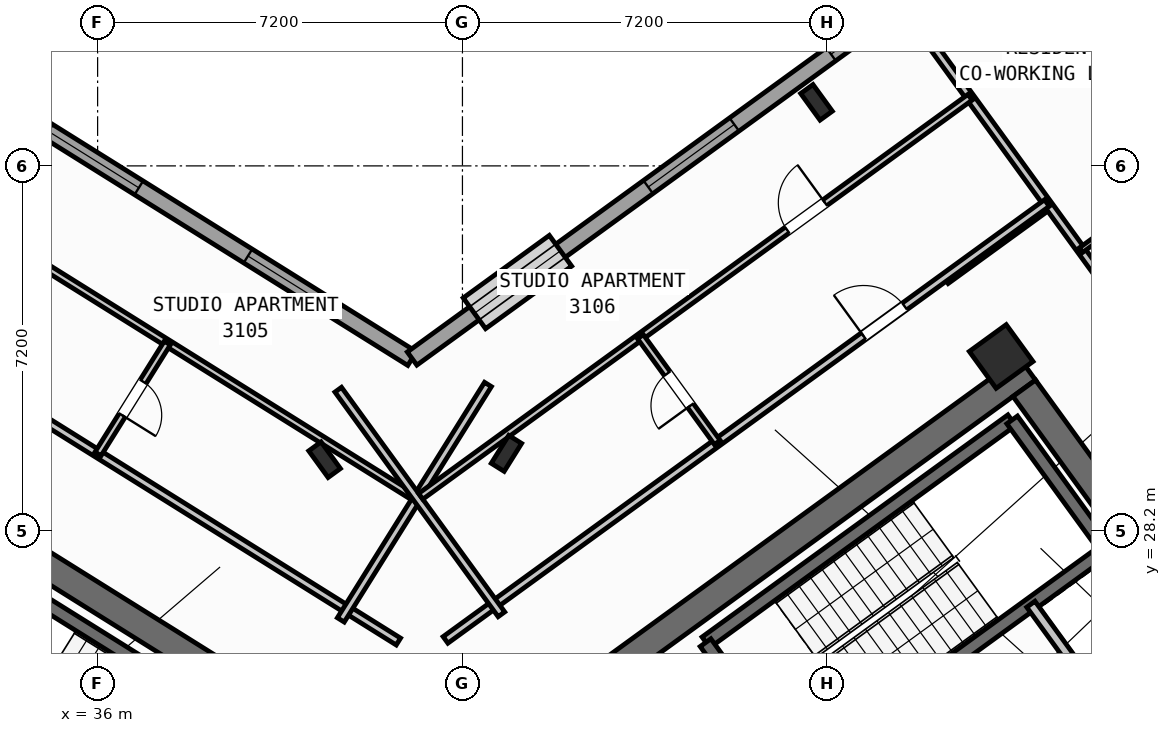
"""IFC4 building model, lengths in metres.
Left out: names, types, materials, properties, quantities, classifications, styles, units other than length and angle.
Written with IfcOpenShell. Run it as: python <this file> out.ifc"""

import sys

from ifc_helpers import new_model, si_unit, direction, frame, frame_2d, origin, origin_2d, place, context, subcontext, project, spatial, rectangle, hollow_rectangle, i_section, extrude, source, transform, mapped, element, fill, save


model = new_model("IFC4")
c1 = context("Model", 3, precision=1e-05, world=origin(), true_north=direction((0.0, 1.0)))
c2 = subcontext(c1, "Body", "Model", "MODEL_VIEW")
j1 = project(units=[si_unit("LENGTHUNIT", "METRE"), si_unit("PLANEANGLEUNIT", "RADIAN")], contexts=[c1])
p1 = place(None, origin())
s1 = spatial("IfcSite", under=j1, at=p1, CompositionType="ELEMENT")
p2 = place(p1, origin())
s2 = spatial("IfcBuilding", under=s1, at=p2, CompositionType="ELEMENT")
p3 = place(p2, frame((0.0, 0.0, 123.3)))
s3 = spatial("IfcBuildingStorey", under=s2, at=p3, CompositionType="ELEMENT", Elevation=123.3)
p4 = place(p3, frame((40.573, 24.01, 0.0), z_axis=(0.0, 0.0, 1.0), x_axis=(-0.848047359947, 0.529920442413, 0.0)))
e1 = element("IfcWall", 1, at=p4, inside=s3, PredefinedType="SHEAR", context=c2, shape_type="SweptSolid", body=[
    extrude(rectangle(XDim=13.14, YDim=0.55, at=frame_2d((6.57, 0.0))), origin(), (0.0, 0.0, 1.0), 4.22),
])
p5 = place(p3, frame((44.365, 24.142, 0.0), z_axis=(0.0, 0.0, 1.0), x_axis=(0.809024304885, 0.587775190107, 0.0)))
e2 = element("IfcWall", 2, at=p5, inside=s3, PredefinedType="SHEAR", context=c2, shape_type="SweptSolid", body=[
    extrude(rectangle(XDim=12.34, YDim=0.55, at=frame_2d((6.17, 0.0))), origin(), (0.0, 0.0, 1.0), 4.22),
])
p6 = place(p3, frame((58.064, 25.813, 0.0), z_axis=(0.0, 0.0, 1.0), x_axis=(-0.587764933797, 0.809031756236, 0.0)))
e3 = element("IfcWall", 3, at=p6, inside=s3, PredefinedType="SHEAR", context=c2, shape_type="SweptSolid", body=[
    extrude(rectangle(XDim=6.425, YDim=0.55, at=frame_2d((3.212, 0.0))), origin(), (0.0, 0.0, 1.0), 4.22),
])
m1 = source(origin(), c2, "Body", "SweptSolid", [
    extrude(i_section(OverallWidth=0.3, OverallDepth=0.65, WebThickness=0.016, FlangeThickness=0.031, at=origin_2d()), origin(), (0.0, 0.0, 1.0), 4.5),
])
for number, where, z_axis, x_axis in (
    (4, (44.068, 29.726, 0.0), (0.0, 0.0, 1.0), (-0.848, 0.53, 0.0)),
    (5, (40.479, 29.601, 0.0), (0.0, 0.0, 1.0), (0.809, 0.588, 0.0)),
):
    element("IfcColumn", number, at=place(p3, frame(where, z_axis=z_axis, x_axis=x_axis)), inside=s3, PredefinedType="COLUMN", context=c2, shape_type="MappedRepresentation", body=[
        mapped(m1, transform((0.0, 0.0, 0.0), scale=1.0)),
    ])
m2 = source(origin(), c2, "Body", "SweptSolid", [
    extrude(hollow_rectangle(XDim=0.9, YDim=0.9, WallThickness=0.036, at=origin_2d()), origin(), (0.0, 0.0, 1.0), 4.5),
])
p7 = place(p3, frame((53.832, 31.638, 0.0), z_axis=(0.0, 0.0, 1.0), x_axis=(0.809016994375, 0.587785252292, 0.0)))
e6 = element("IfcColumn", 6, at=p7, inside=s3, PredefinedType="COLUMN", context=c2, shape_type="MappedRepresentation", body=[
    mapped(m2, transform((0.0, 0.0, 0.0), scale=1.0)),
])
p8 = place(p3, frame((50.188, 36.654, 0.0), z_axis=(0.0, 0.0, 1.0), x_axis=(0.809016994375, 0.587785252292, 0.0)))
e7 = element("IfcColumn", 7, at=p8, inside=s3, PredefinedType="COLUMN", context=c2, shape_type="MappedRepresentation", body=[
    mapped(m1, transform((0.0, 0.0, 0.0), scale=1.0)),
])
p9 = place(p3, frame((17.424, 47.083, 0.0), z_axis=(0.0, 0.0, 1.0), x_axis=(0.848049927979, -0.529916332693, 0.0)))
e8 = element("IfcWall", 8, at=p9, inside=s3, PredefinedType="STANDARD", context=c2, shape_type="SweptSolid", body=[
    extrude(rectangle(XDim=29.223, YDim=0.32, at=frame_2d((14.612, 0.0))), origin(), (0.0, 0.0, 1.0), 4.22),
])
p10 = place(p9, frame((8.839, 0.0, 0.0)))
e9 = element("IfcOpeningElement", 9, at=p10, cuts=e8, PredefinedType="OPENING", context=c2, shape_type="SweptSolid", body=[
    extrude(rectangle(XDim=1.05, YDim=2.15, at=frame_2d((0.525, 1.075))), frame((0.0, 0.17, 0.0), z_axis=(0.0, -1.0, 0.0), x_axis=(1.0, 0.0, 0.0)), (0.0, 0.0, 1.0), 0.34),
])
p11 = place(p9, frame((0.719, 0.0, 0.85)))
e10 = element("IfcOpeningElement", 10, at=p11, cuts=e8, PredefinedType="OPENING", context=c2, shape_type="SweptSolid", body=[
    extrude(rectangle(XDim=1.8, YDim=1.5, at=frame_2d((0.9, 0.75))), frame((0.0, 0.17, 0.0), z_axis=(0.0, -1.0, 0.0), x_axis=(1.0, 0.0, 0.0)), (0.0, 0.0, 1.0), 0.34),
])
p12 = place(p9, frame((3.981, 0.0, 0.85)))
e11 = element("IfcOpeningElement", 11, at=p12, cuts=e8, PredefinedType="OPENING", context=c2, shape_type="SweptSolid", body=[
    extrude(rectangle(XDim=1.5, YDim=1.5, at=frame_2d((0.75, 0.75))), frame((0.0, 0.17, 0.0), z_axis=(0.0, -1.0, 0.0), x_axis=(1.0, 0.0, 0.0)), (0.0, 0.0, 1.0), 0.34),
])
p13 = place(p9, frame((7.021, 0.0, 0.95)))
e12 = element("IfcOpeningElement", 12, at=p13, cuts=e8, PredefinedType="OPENING", context=c2, shape_type="SweptSolid", body=[
    extrude(rectangle(XDim=1.2, YDim=1.4, at=frame_2d((0.6, 0.7))), frame((0.0, 0.17, 0.0), z_axis=(0.0, -1.0, 0.0), x_axis=(1.0, 0.0, 0.0)), (0.0, 0.0, 1.0), 0.34),
])
p14 = place(p9, frame((14.471, 0.0, 0.95)))
e13 = element("IfcOpeningElement", 13, at=p14, cuts=e8, PredefinedType="OPENING", context=c2, shape_type="SweptSolid", body=[
    extrude(rectangle(XDim=1.2, YDim=1.4, at=frame_2d((0.6, 0.7))), frame((0.0, 0.17, 0.0), z_axis=(0.0, -1.0, 0.0), x_axis=(1.0, 0.0, 0.0)), (0.0, 0.0, 1.0), 0.34),
])
p15 = place(p9, frame((17.254, 0.0, 1.0)))
e14 = element("IfcOpeningElement", 14, at=p15, cuts=e8, PredefinedType="OPENING", context=c2, shape_type="SweptSolid", body=[
    extrude(rectangle(XDim=0.9, YDim=1.25, at=frame_2d((0.45, 0.625))), frame((0.0, 0.17, 0.0), z_axis=(0.0, -1.0, 0.0), x_axis=(1.0, 0.0, 0.0)), (0.0, 0.0, 1.0), 0.34),
])
p16 = place(p9, frame((20.764, 0.0, 0.8)))
e15 = element("IfcOpeningElement", 15, at=p16, cuts=e8, PredefinedType="OPENING", context=c2, shape_type="SweptSolid", body=[
    extrude(rectangle(XDim=2.1, YDim=1.55, at=frame_2d((1.05, 0.775))), frame((0.0, 0.17, 0.0), z_axis=(0.0, -1.0, 0.0), x_axis=(1.0, 0.0, 0.0)), (0.0, 0.0, 1.0), 0.34),
])
p17 = place(p9, frame((25.403, 0.0, 0.8)))
e16 = element("IfcOpeningElement", 16, at=p17, cuts=e8, PredefinedType="OPENING", context=c2, shape_type="SweptSolid", body=[
    extrude(rectangle(XDim=2.1, YDim=1.55, at=frame_2d((1.05, 0.775))), frame((0.0, 0.17, 0.0), z_axis=(0.0, -1.0, 0.0), x_axis=(1.0, 0.0, 0.0)), (0.0, 0.0, 1.0), 0.34),
])
p18 = place(p3, frame((42.207, 31.597, 0.0), z_axis=(0.0, 0.0, 1.0), x_axis=(0.809020333377, 0.587780656523, 0.0)))
e17 = element("IfcWall", 17, at=p18, inside=s3, PredefinedType="STANDARD", context=c2, shape_type="SweptSolid", body=[
    extrude(rectangle(XDim=15.223, YDim=0.32, at=frame_2d((7.611, 0.0))), origin(), (0.0, 0.0, 1.0), 4.22),
])
p19 = place(p18, frame((12.82, 0.0, 0.0)))
e18 = element("IfcOpeningElement", 18, at=p19, cuts=e17, PredefinedType="OPENING", context=c2, shape_type="SweptSolid", body=[
    extrude(rectangle(XDim=1.05, YDim=2.15, at=frame_2d((0.525, 1.075))), frame((0.0, 0.17, 0.0), z_axis=(0.0, -1.0, 0.0), x_axis=(1.0, 0.0, 0.0)), (0.0, 0.0, 1.0), 0.34),
])
p20 = place(p18, frame((1.52, 0.0, 0.8)))
e19 = element("IfcOpeningElement", 19, at=p20, cuts=e17, PredefinedType="OPENING", context=c2, shape_type="SweptSolid", body=[
    extrude(rectangle(XDim=2.1, YDim=1.55, at=frame_2d((1.05, 0.775))), frame((0.0, 0.17, 0.0), z_axis=(0.0, -1.0, 0.0), x_axis=(1.0, 0.0, 0.0)), (0.0, 0.0, 1.0), 0.34),
])
p21 = place(p18, frame((5.76, 0.0, 0.8)))
e20 = element("IfcOpeningElement", 20, at=p21, cuts=e17, PredefinedType="OPENING", context=c2, shape_type="SweptSolid", body=[
    extrude(rectangle(XDim=2.1, YDim=1.55, at=frame_2d((1.05, 0.775))), frame((0.0, 0.17, 0.0), z_axis=(0.0, -1.0, 0.0), x_axis=(1.0, 0.0, 0.0)), (0.0, 0.0, 1.0), 0.34),
])
p22 = place(p18, frame((10.219, 0.0, 1.0)))
e21 = element("IfcOpeningElement", 21, at=p22, cuts=e17, PredefinedType="OPENING", context=c2, shape_type="SweptSolid", body=[
    extrude(rectangle(XDim=0.9, YDim=1.25, at=frame_2d((0.45, 0.625))), frame((0.0, 0.17, 0.0), z_axis=(0.0, -1.0, 0.0), x_axis=(1.0, 0.0, 0.0)), (0.0, 0.0, 1.0), 0.34),
])
p23 = place(p3, frame((54.81, 40.5, 0.0), z_axis=(0.0, 0.0, 1.0), x_axis=(0.587783625747, -0.809018176127, 0.0)))
e22 = element("IfcWall", 22, at=p23, inside=s3, PredefinedType="STANDARD", context=c2, shape_type="SweptSolid", body=[
    extrude(rectangle(XDim=21.587, YDim=0.32, at=frame_2d((10.794, 0.0))), origin(), (0.0, 0.0, 1.0), 2.395),
])
p24 = place(p23, frame((1.681, 0.0, 1.0)))
e23 = element("IfcOpeningElement", 23, at=p24, cuts=e22, PredefinedType="OPENING", context=c2, shape_type="SweptSolid", body=[
    extrude(rectangle(XDim=0.9, YDim=1.25, at=frame_2d((0.45, 0.625))), frame((0.0, 0.17, 0.0), z_axis=(0.0, -1.0, 0.0), x_axis=(1.0, 0.0, 0.0)), (0.0, 0.0, 1.0), 0.34),
])
p25 = place(p23, frame((3.805, 0.0, 1.0)))
e24 = element("IfcOpeningElement", 24, at=p25, cuts=e22, PredefinedType="OPENING", context=c2, shape_type="SweptSolid", body=[
    extrude(rectangle(XDim=0.9, YDim=1.25, at=frame_2d((0.45, 0.625))), frame((0.0, 0.17, 0.0), z_axis=(0.0, -1.0, 0.0), x_axis=(1.0, 0.0, 0.0)), (0.0, 0.0, 1.0), 0.34),
])
p26 = place(p23, frame((8.369, 0.0, 1.0)))
e25 = element("IfcOpeningElement", 25, at=p26, cuts=e22, PredefinedType="OPENING", context=c2, shape_type="SweptSolid", body=[
    extrude(rectangle(XDim=0.9, YDim=1.25, at=frame_2d((0.45, 0.625))), frame((0.0, 0.17, 0.0), z_axis=(0.0, -1.0, 0.0), x_axis=(1.0, 0.0, 0.0)), (0.0, 0.0, 1.0), 0.34),
])
p27 = place(p23, frame((11.219, 0.0, 1.0)))
e26 = element("IfcOpeningElement", 26, at=p27, cuts=e22, PredefinedType="OPENING", context=c2, shape_type="SweptSolid", body=[
    extrude(rectangle(XDim=0.9, YDim=1.25, at=frame_2d((0.45, 0.625))), frame((0.0, 0.17, 0.0), z_axis=(0.0, -1.0, 0.0), x_axis=(1.0, 0.0, 0.0)), (0.0, 0.0, 1.0), 0.34),
])
p28 = place(p23, frame((18.609, 0.0, 1.0)))
e27 = element("IfcOpeningElement", 27, at=p28, cuts=e22, PredefinedType="OPENING", context=c2, shape_type="SweptSolid", body=[
    extrude(rectangle(XDim=0.9, YDim=1.25, at=frame_2d((0.45, 0.625))), frame((0.0, 0.17, 0.0), z_axis=(0.0, -1.0, 0.0), x_axis=(1.0, 0.0, 0.0)), (0.0, 0.0, 1.0), 0.34),
])
p29 = place(p3, frame((39.721, 23.788, 0.0), z_axis=(0.0, 0.0, 1.0), x_axis=(-0.848054434086, 0.529909121291, 0.0)))
e28 = element("IfcWall", 28, at=p29, inside=s3, PredefinedType="SHEAR", context=c2, shape_type="SweptSolid", body=[
    extrude(rectangle(XDim=7.33, YDim=0.26, at=frame_2d((3.665, 0.0))), origin(), (0.0, 0.0, 1.0), 4.22),
])
p30 = place(p3, frame((48.006, 25.996, 0.0), z_axis=(0.0, 0.0, 1.0), x_axis=(0.80901903764, 0.587782439969, 0.0)))
e29 = element("IfcWall", 29, at=p30, inside=s3, PredefinedType="SHEAR", context=c2, shape_type="SweptSolid", body=[
    extrude(rectangle(XDim=7.46, YDim=0.26, at=frame_2d((3.73, 0.0))), origin(), (0.0, 0.0, 1.0), 4.22),
])
p31 = place(p3, frame((49.863, 23.44, 0.0), z_axis=(0.0, 0.0, 1.0), x_axis=(0.809003474932, 0.587803859759, 0.0)))
e30 = element("IfcWall", 30, at=p31, inside=s3, PredefinedType="SHEAR", context=c2, shape_type="SweptSolid", body=[
    extrude(rectangle(XDim=7.46, YDim=0.26, at=frame_2d((3.73, 0.0))), origin(), (0.0, 0.0, 1.0), 4.22),
])
p32 = place(p31, frame((0.36, 0.0, 0.0)))
e31 = element("IfcOpeningElement", 31, at=p32, cuts=e30, PredefinedType="OPENING", context=c2, shape_type="SweptSolid", body=[
    extrude(rectangle(XDim=0.86, YDim=2.05, at=frame_2d((0.43, 1.025))), frame((0.0, 0.14, 0.0), z_axis=(0.0, -1.0, 0.0), x_axis=(1.0, 0.0, 0.0)), (0.0, 0.0, 1.0), 0.28),
])
p33 = place(p3, frame((49.855, 23.434, 0.0), z_axis=(0.0, 0.0, 1.0), x_axis=(-0.58776738483, 0.809029975545, 0.0)))
e32 = element("IfcWall", 32, at=p33, inside=s3, PredefinedType="SHEAR", context=c2, shape_type="SweptSolid", body=[
    extrude(rectangle(XDim=3.16, YDim=0.26, at=frame_2d((1.58, 0.0))), origin(), (0.0, 0.0, 1.0), 4.22),
])
p34 = place(p3, frame((55.906, 27.831, 0.0), z_axis=(0.0, 0.0, 1.0), x_axis=(-0.587804123638, 0.809003283204, 0.0)))
e33 = element("IfcWall", 33, at=p34, inside=s3, PredefinedType="SHEAR", context=c2, shape_type="SweptSolid", body=[
    extrude(rectangle(XDim=3.16, YDim=0.26, at=frame_2d((1.58, 0.0))), origin(), (0.0, 0.0, 1.0), 4.22),
])
p35 = place(p3, frame((56.111, 24.419, 0.0), z_axis=(0.0, 0.0, 1.0), x_axis=(-0.58777848983, 0.809021907548, 0.0)))
e34 = element("IfcWall", 34, at=p35, inside=s3, PredefinedType="STANDARD", context=c2, shape_type="SweptSolid", body=[
    extrude(rectangle(XDim=2.88, YDim=0.2, at=frame_2d((1.44, 0.0))), origin(), (0.0, 0.0, 1.0), 4.21),
])
p36 = place(p3, frame((41.936, 26.012, 0.0), z_axis=(0.0, 0.0, 1.0), x_axis=(-0.848051154596, 0.529914369676, 0.0)))
e35 = element("IfcWall", 35, at=p36, inside=s3, PredefinedType="PARTITIONING", context=c2, shape_type="SweptSolid", body=[
    extrude(rectangle(XDim=15.57, YDim=0.16, at=frame_2d((7.785, 0.0))), origin(), (0.0, 0.0, 1.0), 4.21),
])
p37 = place(p36, frame((10.83, 0.0, 0.0)))
e36 = element("IfcOpeningElement", 36, at=p37, cuts=e35, PredefinedType="OPENING", context=c2, shape_type="SweptSolid", body=[
    extrude(rectangle(XDim=1.0, YDim=2.1, at=frame_2d((0.5, 1.05))), frame((0.0, 0.09, 0.0), z_axis=(0.0, -1.0, 0.0), x_axis=(1.0, 0.0, 0.0)), (0.0, 0.0, 1.0), 0.18),
])
p38 = place(p3, frame((43.704, 31.086, 0.0), z_axis=(0.0, 0.0, 1.0), x_axis=(-0.529906828443, -0.848055866774, 0.0)))
e37 = element("IfcWall", 37, at=p38, inside=s3, PredefinedType="PARTITIONING", context=c2, shape_type="SweptSolid", body=[
    extrude(rectangle(XDim=5.48, YDim=0.16, at=frame_2d((2.74, 0.0))), origin(), (0.0, 0.0, 1.0), 4.21),
])
p39 = place(p3, frame((42.226, 28.873, 0.0), z_axis=(0.0, 0.0, 1.0), x_axis=(-0.848049134363, 0.529917602752, 0.0)))
e38 = element("IfcWall", 38, at=p39, inside=s3, PredefinedType="PLUMBINGWALL", context=c2, shape_type="SweptSolid", body=[
    extrude(rectangle(XDim=14.3, YDim=0.14, at=frame_2d((7.15, 0.0))), origin(), (0.0, 0.0, 1.0), 4.21),
])
p40 = place(p39, frame((9.57, 0.0, 0.0)))
e39 = element("IfcOpeningElement", 39, at=p40, cuts=e38, PredefinedType="OPENING", context=c2, shape_type="SweptSolid", body=[
    extrude(rectangle(XDim=0.92, YDim=2.08, at=frame_2d((0.46, 1.04))), frame((0.0, 0.08, 0.0), z_axis=(0.0, -1.0, 0.0), x_axis=(1.0, 0.0, 0.0)), (0.0, 0.0, 1.0), 0.16),
])
p41 = place(p3, frame((37.375, 31.904, 0.0), z_axis=(0.0, 0.0, 1.0), x_axis=(-0.529913878929, -0.848051461244, 0.0)))
e40 = element("IfcWall", 40, at=p41, inside=s3, PredefinedType="PLUMBINGWALL", context=c2, shape_type="SweptSolid", body=[
    extrude(rectangle(XDim=2.58, YDim=0.14, at=frame_2d((1.29, 0.0))), origin(), (0.0, 0.0, 1.0), 4.21),
])
p42 = place(p41, frame((0.9, 0.0, 0.0)))
e41 = element("IfcOpeningElement", 41, at=p42, cuts=e40, PredefinedType="OPENING", context=c2, shape_type="SweptSolid", body=[
    extrude(rectangle(XDim=0.78, YDim=2.05, at=frame_2d((0.39, 1.025))), frame((0.0, 0.08, 0.0), z_axis=(0.0, -1.0, 0.0), x_axis=(1.0, 0.0, 0.0)), (0.0, 0.0, 1.0), 0.16),
])
p43 = place(p3, frame((52.739, 33.143, 0.0), z_axis=(0.0, 0.0, 1.0), x_axis=(0.809000999347, 0.58780726693, 0.0)))
e42 = element("IfcWall", 42, at=p43, inside=s3, PredefinedType="PARTITIONING", context=c2, shape_type="SweptSolid", body=[
    extrude(rectangle(XDim=2.51, YDim=0.16, at=frame_2d((1.255, 0.0))), origin(), (0.0, 0.0, 1.0), 4.21),
])
p44 = place(p3, frame((60.829, 26.278, 0.0), z_axis=(0.0, 0.0, 1.0), x_axis=(-0.587777474174, 0.809022645451, 0.0)))
e43 = element("IfcWall", 43, at=p44, inside=s3, PredefinedType="PARTITIONING", context=c2, shape_type="SweptSolid", body=[
    extrude(rectangle(XDim=15.1, YDim=0.16, at=frame_2d((7.55, 0.0))), origin(), (0.0, 0.0, 1.0), 4.21),
])
p45 = place(p3, frame((55.409, 33.738, 0.0), z_axis=(0.0, 0.0, 1.0), x_axis=(0.809005039917, 0.58780170584, 0.0)))
e44 = element("IfcWall", 44, at=p45, inside=s3, PredefinedType="PARTITIONING", context=c2, shape_type="SweptSolid", body=[
    extrude(rectangle(XDim=3.61, YDim=0.11, at=frame_2d((1.805, 0.0))), origin(), (0.0, 0.0, 1.0), 4.21),
])
p46 = place(p45, frame((1.345, 0.0, 0.0)))
e45 = element("IfcOpeningElement", 45, at=p46, cuts=e44, PredefinedType="OPENING", context=c2, shape_type="SweptSolid", body=[
    extrude(rectangle(XDim=0.92, YDim=2.08, at=frame_2d((0.46, 1.04))), frame((0.0, 0.065, 0.0), z_axis=(0.0, -1.0, 0.0), x_axis=(1.0, 0.0, 0.0)), (0.0, 0.0, 1.0), 0.13),
])
p47 = place(p3, frame((42.866, 26.044, 0.0), z_axis=(0.0, 0.0, 1.0), x_axis=(0.809020254154, 0.587780765566, 0.0)))
e46 = element("IfcWall", 46, at=p47, inside=s3, PredefinedType="PARTITIONING", context=c2, shape_type="SweptSolid", body=[
    extrude(rectangle(XDim=14.67, YDim=0.16, at=frame_2d((7.335, 0.0))), origin(), (0.0, 0.0, 1.0), 4.21),
])
p48 = place(p47, frame((10.2, 0.0, 0.0)))
e47 = element("IfcOpeningElement", 47, at=p48, cuts=e46, PredefinedType="OPENING", context=c2, shape_type="SweptSolid", body=[
    extrude(rectangle(XDim=1.0, YDim=2.1, at=frame_2d((0.5, 1.05))), frame((0.0, 0.09, 0.0), z_axis=(0.0, -1.0, 0.0), x_axis=(1.0, 0.0, 0.0)), (0.0, 0.0, 1.0), 0.18),
])
p49 = place(p3, frame((43.969, 26.55, 0.0), z_axis=(0.0, 0.0, 1.0), x_axis=(-0.587776919386, 0.80902304852, 0.0)))
e48 = element("IfcWall", 48, at=p49, inside=s3, PredefinedType="PARTITIONING", context=c2, shape_type="SweptSolid", body=[
    extrude(rectangle(XDim=5.48, YDim=0.16, at=frame_2d((2.74, 0.0))), origin(), (0.0, 0.0, 1.0), 4.21),
])
p50 = place(p3, frame((42.377, 28.878, 0.0), z_axis=(0.0, 0.0, 1.0), x_axis=(0.809020411523, 0.587780548963, 0.0)))
e49 = element("IfcWall", 49, at=p50, inside=s3, PredefinedType="PLUMBINGWALL", context=c2, shape_type="SweptSolid", body=[
    extrude(rectangle(XDim=13.4, YDim=0.14, at=frame_2d((6.7, 0.0))), origin(), (0.0, 0.0, 1.0), 4.21),
])
p51 = place(p50, frame((8.94, 0.0, 0.0)))
e50 = element("IfcOpeningElement", 50, at=p51, cuts=e49, PredefinedType="OPENING", context=c2, shape_type="SweptSolid", body=[
    extrude(rectangle(XDim=0.92, YDim=2.08, at=frame_2d((0.46, 1.04))), frame((0.0, 0.08, 0.0), z_axis=(0.0, -1.0, 0.0), x_axis=(1.0, 0.0, 0.0)), (0.0, 0.0, 1.0), 0.16),
])
p52 = place(p3, frame((48.229, 29.941, 0.0), z_axis=(0.0, 0.0, 1.0), x_axis=(-0.587772116736, 0.809026537752, 0.0)))
e51 = element("IfcWall", 51, at=p52, inside=s3, PredefinedType="PLUMBINGWALL", context=c2, shape_type="SweptSolid", body=[
    extrude(rectangle(XDim=2.58, YDim=0.14, at=frame_2d((1.29, 0.0))), origin(), (0.0, 0.0, 1.0), 4.21),
])
p53 = place(p52, frame((0.9, 0.0, 0.0)))
e52 = element("IfcOpeningElement", 52, at=p53, cuts=e51, PredefinedType="OPENING", context=c2, shape_type="SweptSolid", body=[
    extrude(rectangle(XDim=0.78, YDim=2.05, at=frame_2d((0.39, 1.025))), frame((0.0, 0.08, 0.0), z_axis=(0.0, -1.0, 0.0), x_axis=(1.0, 0.0, 0.0)), (0.0, 0.0, 1.0), 0.16),
])
m3 = source(origin(), c2, "Body", "SweptSolid", [
    extrude(rectangle(XDim=2.1, YDim=1.55, at=frame_2d((1.05, 0.775))), frame((0.0, 0.03, 0.0), z_axis=(0.0, -1.0, 0.0), x_axis=(1.0, 0.0, 0.0)), (0.0, 0.0, 1.0), 0.06),
])
p54 = place(p16, origin())
e53 = element("IfcWindow", 53, at=p54, inside=s3, PartitioningType="SINGLE_PANEL", PredefinedType="WINDOW", context=c2, shape_type="MappedRepresentation", body=[
    mapped(m3, transform((0.0, 0.0, 0.0), scale=1.0)),
])
fill(e15, e53)
p55 = place(p17, origin())
e54 = element("IfcWindow", 54, at=p55, inside=s3, PartitioningType="SINGLE_PANEL", PredefinedType="WINDOW", context=c2, shape_type="MappedRepresentation", body=[
    mapped(m3, transform((0.0, 0.0, 0.0), scale=1.0)),
])
fill(e16, e54)
p56 = place(p20, origin())
e55 = element("IfcWindow", 55, at=p56, inside=s3, PartitioningType="SINGLE_PANEL", PredefinedType="WINDOW", context=c2, shape_type="MappedRepresentation", body=[
    mapped(m3, transform((0.0, 0.0, 0.0), scale=1.0)),
])
fill(e19, e55)
p57 = place(p21, origin())
e56 = element("IfcWindow", 56, at=p57, inside=s3, PartitioningType="SINGLE_PANEL", PredefinedType="WINDOW", context=c2, shape_type="MappedRepresentation", body=[
    mapped(m3, transform((0.0, 0.0, 0.0), scale=1.0)),
])
fill(e20, e56)
m4 = source(origin(), c2, "Body", "SweptSolid", [
    extrude(rectangle(XDim=0.9, YDim=1.25, at=frame_2d((0.45, 0.625))), frame((0.0, 0.03, 0.0), z_axis=(0.0, -1.0, 0.0), x_axis=(1.0, 0.0, 0.0)), (0.0, 0.0, 1.0), 0.06),
])
p58 = place(p22, origin())
e57 = element("IfcWindow", 57, at=p58, inside=s3, PartitioningType="SINGLE_PANEL", PredefinedType="WINDOW", context=c2, shape_type="MappedRepresentation", body=[
    mapped(m4, transform((0.0, 0.0, 0.0), scale=1.0)),
])
fill(e21, e57)
m5 = source(origin(), c2, "Body", "SweptSolid", [
    extrude(rectangle(XDim=0.78, YDim=2.05, at=frame_2d((0.39, 1.025))), frame((0.0, 0.025, 0.0), z_axis=(0.0, -1.0, 0.0), x_axis=(1.0, 0.0, 0.0)), (0.0, 0.0, 1.0), 0.05),
])
p59 = place(p42, origin())
e58 = element("IfcDoor", 58, at=p59, inside=s3, OperationType="SINGLE_SWING_RIGHT", PredefinedType="DOOR", context=c2, shape_type="MappedRepresentation", body=[
    mapped(m5, transform((0.0, 0.0, 0.0), scale=1.0)),
])
fill(e41, e58)
m6 = source(origin(), c2, "Body", "SweptSolid", [
    extrude(rectangle(XDim=1.0, YDim=2.1, at=frame_2d((0.5, 1.05))), frame((0.0, 0.025, 0.0), z_axis=(0.0, -1.0, 0.0), x_axis=(1.0, 0.0, 0.0)), (0.0, 0.0, 1.0), 0.05),
])
p60 = place(p48, origin())
e59 = element("IfcDoor", 59, at=p60, inside=s3, OperationType="SINGLE_SWING_LEFT", PredefinedType="DOOR", context=c2, shape_type="MappedRepresentation", body=[
    mapped(m6, transform((0.0, 0.0, 0.0), scale=1.0)),
])
fill(e47, e59)
m7 = source(origin(), c2, "Body", "SweptSolid", [
    extrude(rectangle(XDim=0.92, YDim=2.08, at=frame_2d((0.46, 1.04))), frame((0.0, 0.025, 0.0), z_axis=(0.0, -1.0, 0.0), x_axis=(1.0, 0.0, 0.0)), (0.0, 0.0, 1.0), 0.05),
])
p61 = place(p51, origin())
e60 = element("IfcDoor", 60, at=p61, inside=s3, OperationType="SINGLE_SWING_RIGHT", PredefinedType="DOOR", context=c2, shape_type="MappedRepresentation", body=[
    mapped(m7, transform((0.0, 0.0, 0.0), scale=1.0)),
])
fill(e50, e60)
p62 = place(p53, origin())
e61 = element("IfcDoor", 61, at=p62, inside=s3, OperationType="SINGLE_SWING_LEFT", PredefinedType="DOOR", context=c2, shape_type="MappedRepresentation", body=[
    mapped(m5, transform((0.0, 0.0, 0.0), scale=1.0)),
])
fill(e52, e61)
save(model, sys.argv[1])
